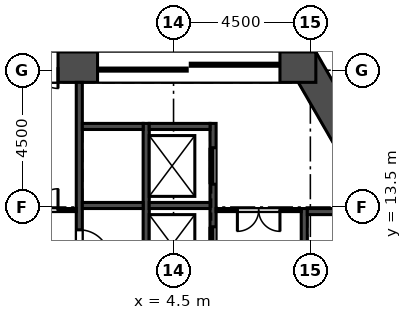
"""IFC4 building model, lengths in metres.
Left out: names, types, materials, properties, quantities, classifications, styles, units other than length and angle.
Written with IfcOpenShell. Run it as: python <this file> out.ifc"""

import sys

from ifc_helpers import new_model, si_unit, direction, frame, frame_2d, origin, place, context, subcontext, project, spatial, rectangle, extrude, element, fill, save


model = new_model("IFC4")
c1 = context("Model", 3, precision=1e-05, world=origin(), true_north=direction((0.0, 1.0)))
c2 = subcontext(c1, "Body", "Model", "MODEL_VIEW")
j1 = project(units=[si_unit("LENGTHUNIT", "METRE"), si_unit("PLANEANGLEUNIT", "RADIAN")], contexts=[c1])
p1 = place(None, origin())
s1 = spatial("IfcSite", under=j1, at=p1, CompositionType="ELEMENT")
p2 = place(p1, origin())
s2 = spatial("IfcBuilding", under=s1, at=p2, CompositionType="ELEMENT")
p3 = place(p2, frame((0.0, 0.0, 218.1)))
s3 = spatial("IfcBuildingStorey", under=s2, at=p3, CompositionType="ELEMENT", Elevation=218.1)
p4 = place(p3, frame((13.167, 10.695, 0.0), z_axis=(0.0, 0.0, 1.0), x_axis=(-0.499995021168, 0.866028278295, 0.0)))
e1 = element("IfcWall", 1, at=p4, inside=s3, PredefinedType="SHEAR", context=c2, shape_type="SweptSolid", body=[
    extrude(rectangle(XDim=8.839, YDim=1.0, at=frame_2d((4.419, 0.0))), origin(), (0.0, 0.0, 1.0), 5.4),
])
p5 = place(p3, frame((9.181, 18.1, 0.0), z_axis=(0.0, 0.0, 1.0), x_axis=(-1.0, 0.0, 0.0)))
e2 = element("IfcWall", 2, at=p5, inside=s3, PredefinedType="SHEAR", context=c2, shape_type="SweptSolid", body=[
    extrude(rectangle(XDim=18.361, YDim=1.0, at=frame_2d((9.181, 0.0))), origin(), (0.0, 0.0, 1.0), 5.4),
])
p6 = place(p5, frame((8.481, 0.0, 0.0)))
e3 = element("IfcOpeningElement", 3, at=p6, cuts=e2, PredefinedType="OPENING", context=c2, shape_type="SweptSolid", body=[
    extrude(rectangle(XDim=1.4, YDim=2.1, at=frame_2d((0.7, 1.05))), frame((0.0, 0.51, 0.0), z_axis=(0.0, -1.0, 0.0), x_axis=(1.0, 0.0, 0.0)), (0.0, 0.0, 1.0), 1.02),
])
p7 = place(p5, frame((11.181, 0.0, 0.0)))
e4 = element("IfcOpeningElement", 4, at=p7, cuts=e2, PredefinedType="OPENING", context=c2, shape_type="SweptSolid", body=[
    extrude(rectangle(XDim=6.0, YDim=2.4, at=frame_2d((3.0, 1.2))), frame((0.0, 0.51, 0.0), z_axis=(0.0, -1.0, 0.0), x_axis=(1.0, 0.0, 0.0)), (0.0, 0.0, 1.0), 1.02),
])
p8 = place(p5, frame((1.181, 0.0, 0.0)))
e5 = element("IfcOpeningElement", 5, at=p8, cuts=e2, PredefinedType="OPENING", context=c2, shape_type="SweptSolid", body=[
    extrude(rectangle(XDim=6.0, YDim=2.4, at=frame_2d((3.0, 1.2))), frame((0.0, 0.51, 0.0), z_axis=(0.0, -1.0, 0.0), x_axis=(1.0, 0.0, 0.0)), (0.0, 0.0, 1.0), 1.02),
])
p9 = place(p3, frame((27.139, 7.709, 0.0), z_axis=(0.0, 0.0, 1.0), x_axis=(-0.500000533701, 0.866025095652, 0.0)))
e6 = element("IfcWall", 6, at=p9, inside=s3, PredefinedType="SOLIDWALL", context=c2, shape_type="SweptSolid", body=[
    extrude(rectangle(XDim=45.573, YDim=0.34, at=frame_2d((22.787, 0.0))), origin(), (0.0, 0.0, 1.0), 5.0),
])
p10 = place(p9, frame((1.893, 0.0, 0.9)))
e7 = element("IfcOpeningElement", 7, at=p10, cuts=e6, PredefinedType="OPENING", context=c2, shape_type="SweptSolid", body=[
    extrude(rectangle(XDim=1.885, YDim=3.0, at=frame_2d((0.942, 1.5))), frame((0.0, 0.18, 0.0), z_axis=(0.0, -1.0, 0.0), x_axis=(1.0, 0.0, 0.0)), (0.0, 0.0, 1.0), 0.36),
])
p11 = place(p9, frame((4.893, 0.0, 0.9)))
e8 = element("IfcOpeningElement", 8, at=p11, cuts=e6, PredefinedType="OPENING", context=c2, shape_type="SweptSolid", body=[
    extrude(rectangle(XDim=1.885, YDim=3.0, at=frame_2d((0.942, 1.5))), frame((0.0, 0.18, 0.0), z_axis=(0.0, -1.0, 0.0), x_axis=(1.0, 0.0, 0.0)), (0.0, 0.0, 1.0), 0.36),
])
p12 = place(p9, frame((7.893, 0.0, 0.9)))
e9 = element("IfcOpeningElement", 9, at=p12, cuts=e6, PredefinedType="OPENING", context=c2, shape_type="SweptSolid", body=[
    extrude(rectangle(XDim=1.885, YDim=3.0, at=frame_2d((0.942, 1.5))), frame((0.0, 0.18, 0.0), z_axis=(0.0, -1.0, 0.0), x_axis=(1.0, 0.0, 0.0)), (0.0, 0.0, 1.0), 0.36),
])
p13 = place(p9, frame((10.893, 0.0, 0.9)))
e10 = element("IfcOpeningElement", 10, at=p13, cuts=e6, PredefinedType="OPENING", context=c2, shape_type="SweptSolid", body=[
    extrude(rectangle(XDim=1.885, YDim=3.0, at=frame_2d((0.942, 1.5))), frame((0.0, 0.18, 0.0), z_axis=(0.0, -1.0, 0.0), x_axis=(1.0, 0.0, 0.0)), (0.0, 0.0, 1.0), 0.36),
])
p14 = place(p9, frame((13.893, 0.0, 0.9)))
e11 = element("IfcOpeningElement", 11, at=p14, cuts=e6, PredefinedType="OPENING", context=c2, shape_type="SweptSolid", body=[
    extrude(rectangle(XDim=1.885, YDim=3.0, at=frame_2d((0.942, 1.5))), frame((0.0, 0.18, 0.0), z_axis=(0.0, -1.0, 0.0), x_axis=(1.0, 0.0, 0.0)), (0.0, 0.0, 1.0), 0.36),
])
p15 = place(p9, frame((16.893, 0.0, 0.9)))
e12 = element("IfcOpeningElement", 12, at=p15, cuts=e6, PredefinedType="OPENING", context=c2, shape_type="SweptSolid", body=[
    extrude(rectangle(XDim=1.885, YDim=3.0, at=frame_2d((0.942, 1.5))), frame((0.0, 0.18, 0.0), z_axis=(0.0, -1.0, 0.0), x_axis=(1.0, 0.0, 0.0)), (0.0, 0.0, 1.0), 0.36),
])
p16 = place(p9, frame((19.893, 0.0, 0.9)))
e13 = element("IfcOpeningElement", 13, at=p16, cuts=e6, PredefinedType="OPENING", context=c2, shape_type="SweptSolid", body=[
    extrude(rectangle(XDim=1.885, YDim=3.0, at=frame_2d((0.942, 1.5))), frame((0.0, 0.18, 0.0), z_axis=(0.0, -1.0, 0.0), x_axis=(1.0, 0.0, 0.0)), (0.0, 0.0, 1.0), 0.36),
])
p17 = place(p9, frame((22.893, 0.0, 0.9)))
e14 = element("IfcOpeningElement", 14, at=p17, cuts=e6, PredefinedType="OPENING", context=c2, shape_type="SweptSolid", body=[
    extrude(rectangle(XDim=1.885, YDim=3.0, at=frame_2d((0.942, 1.5))), frame((0.0, 0.18, 0.0), z_axis=(0.0, -1.0, 0.0), x_axis=(1.0, 0.0, 0.0)), (0.0, 0.0, 1.0), 0.36),
])
p18 = place(p9, frame((25.893, 0.0, 0.9)))
e15 = element("IfcOpeningElement", 15, at=p18, cuts=e6, PredefinedType="OPENING", context=c2, shape_type="SweptSolid", body=[
    extrude(rectangle(XDim=1.885, YDim=3.0, at=frame_2d((0.942, 1.5))), frame((0.0, 0.18, 0.0), z_axis=(0.0, -1.0, 0.0), x_axis=(1.0, 0.0, 0.0)), (0.0, 0.0, 1.0), 0.36),
])
p19 = place(p9, frame((28.893, 0.0, 0.9)))
e16 = element("IfcOpeningElement", 16, at=p19, cuts=e6, PredefinedType="OPENING", context=c2, shape_type="SweptSolid", body=[
    extrude(rectangle(XDim=1.885, YDim=3.0, at=frame_2d((0.942, 1.5))), frame((0.0, 0.18, 0.0), z_axis=(0.0, -1.0, 0.0), x_axis=(1.0, 0.0, 0.0)), (0.0, 0.0, 1.0), 0.36),
])
p20 = place(p9, frame((31.893, 0.0, 0.9)))
e17 = element("IfcOpeningElement", 17, at=p20, cuts=e6, PredefinedType="OPENING", context=c2, shape_type="SweptSolid", body=[
    extrude(rectangle(XDim=1.885, YDim=3.0, at=frame_2d((0.942, 1.5))), frame((0.0, 0.18, 0.0), z_axis=(0.0, -1.0, 0.0), x_axis=(1.0, 0.0, 0.0)), (0.0, 0.0, 1.0), 0.36),
])
p21 = place(p9, frame((34.893, 0.0, 0.9)))
e18 = element("IfcOpeningElement", 18, at=p21, cuts=e6, PredefinedType="OPENING", context=c2, shape_type="SweptSolid", body=[
    extrude(rectangle(XDim=1.885, YDim=3.0, at=frame_2d((0.942, 1.5))), frame((0.0, 0.18, 0.0), z_axis=(0.0, -1.0, 0.0), x_axis=(1.0, 0.0, 0.0)), (0.0, 0.0, 1.0), 0.36),
])
p22 = place(p9, frame((37.893, 0.0, 0.9)))
e19 = element("IfcOpeningElement", 19, at=p22, cuts=e6, PredefinedType="OPENING", context=c2, shape_type="SweptSolid", body=[
    extrude(rectangle(XDim=1.885, YDim=3.0, at=frame_2d((0.942, 1.5))), frame((0.0, 0.18, 0.0), z_axis=(0.0, -1.0, 0.0), x_axis=(1.0, 0.0, 0.0)), (0.0, 0.0, 1.0), 0.36),
])
p23 = place(p9, frame((40.893, 0.0, 0.9)))
e20 = element("IfcOpeningElement", 20, at=p23, cuts=e6, PredefinedType="OPENING", context=c2, shape_type="SweptSolid", body=[
    extrude(rectangle(XDim=1.885, YDim=3.0, at=frame_2d((0.942, 1.5))), frame((0.0, 0.18, 0.0), z_axis=(0.0, -1.0, 0.0), x_axis=(1.0, 0.0, 0.0)), (0.0, 0.0, 1.0), 0.36),
])
p24 = place(p3, frame((8.8, 8.25, -0.4), z_axis=(0.0, 0.0, 1.0), x_axis=(0.0, 1.0, 0.0)))
e21 = element("IfcWall", 21, at=p24, inside=s3, PredefinedType="SOLIDWALL", context=c2, shape_type="SweptSolid", body=[
    extrude(rectangle(XDim=5.2, YDim=0.2, at=frame_2d((2.6, 0.0))), origin(), (0.0, 0.0, 1.0), 5.4),
])
p25 = place(p3, frame((5.8, 8.25, -0.4), z_axis=(0.0, 0.0, 1.0), x_axis=(0.0, 1.0, 0.0)))
e22 = element("IfcWall", 22, at=p25, inside=s3, PredefinedType="SOLIDWALL", context=c2, shape_type="SweptSolid", body=[
    extrude(rectangle(XDim=8.0, YDim=0.2, at=frame_2d((4.0, 0.0))), origin(), (0.0, 0.0, 1.0), 5.4),
])
p26 = place(p25, frame((0.8, 0.0, 0.4)))
e23 = element("IfcOpeningElement", 23, at=p26, cuts=e22, PredefinedType="OPENING", context=c2, shape_type="SweptSolid", body=[
    extrude(rectangle(XDim=1.2, YDim=2.1, at=frame_2d((0.6, 1.05))), frame((0.0, 0.11, 0.0), z_axis=(0.0, -1.0, 0.0), x_axis=(1.0, 0.0, 0.0)), (0.0, 0.0, 1.0), 0.22),
])
p27 = place(p25, frame((3.4, 0.0, 0.4)))
e24 = element("IfcOpeningElement", 24, at=p27, cuts=e22, PredefinedType="OPENING", context=c2, shape_type="SweptSolid", body=[
    extrude(rectangle(XDim=1.2, YDim=2.1, at=frame_2d((0.6, 1.05))), frame((0.0, 0.11, 0.0), z_axis=(0.0, -1.0, 0.0), x_axis=(1.0, 0.0, 0.0)), (0.0, 0.0, 1.0), 0.22),
])
p28 = place(p25, frame((6.0, 0.0, 0.4)))
e25 = element("IfcOpeningElement", 25, at=p28, cuts=e22, PredefinedType="OPENING", context=c2, shape_type="SweptSolid", body=[
    extrude(rectangle(XDim=1.2, YDim=2.1, at=frame_2d((0.6, 1.05))), frame((0.0, 0.11, 0.0), z_axis=(0.0, -1.0, 0.0), x_axis=(1.0, 0.0, 0.0)), (0.0, 0.0, 1.0), 0.22),
])
p29 = place(p3, frame((3.6, 8.45, -0.4), z_axis=(0.0, 0.0, 1.0), x_axis=(0.0, 1.0, 0.0)))
e26 = element("IfcWall", 26, at=p29, inside=s3, PredefinedType="SOLIDWALL", context=c2, shape_type="SweptSolid", body=[
    extrude(rectangle(XDim=7.8, YDim=0.2, at=frame_2d((3.9, 0.0))), origin(), (0.0, 0.0, 1.0), 5.4),
])
p30 = place(p3, frame((1.4, 5.85, -0.4), z_axis=(0.0, 0.0, 1.0), x_axis=(0.0, 1.0, 0.0)))
e27 = element("IfcWall", 27, at=p30, inside=s3, PredefinedType="SOLIDWALL", context=c2, shape_type="SweptSolid", body=[
    extrude(rectangle(XDim=11.75, YDim=0.2, at=frame_2d((5.875, 0.0))), origin(), (0.0, 0.0, 1.0), 5.4),
])
p31 = place(p30, frame((0.65, 0.0, 0.4)))
e28 = element("IfcOpeningElement", 28, at=p31, cuts=e27, PredefinedType="OPENING", context=c2, shape_type="SweptSolid", body=[
    extrude(rectangle(XDim=1.1, YDim=2.1, at=frame_2d((0.55, 1.05))), frame((0.0, 0.11, 0.0), z_axis=(0.0, -1.0, 0.0), x_axis=(1.0, 0.0, 0.0)), (0.0, 0.0, 1.0), 0.22),
])
p32 = place(p30, frame((5.9, 0.0, 0.4)))
e29 = element("IfcOpeningElement", 29, at=p32, cuts=e27, PredefinedType="OPENING", context=c2, shape_type="SweptSolid", body=[
    extrude(rectangle(XDim=1.0, YDim=2.1, at=frame_2d((0.5, 1.05))), frame((0.0, 0.11, 0.0), z_axis=(0.0, -1.0, 0.0), x_axis=(1.0, 0.0, 0.0)), (0.0, 0.0, 1.0), 0.22),
])
for number, where, z_axis, x_axis in (
    (30, (8.9, 13.35, -0.4), (0.0, 0.0, 1.0), (1.0, 0.0, 0.0)),
    (31, (3.7, 13.55, -0.4), (0.0, 0.0, 1.0), (1.0, 0.0, 0.0)),
    (32, (3.7, 16.15, -0.4), (0.0, 0.0, 1.0), (1.0, 0.0, 0.0)),
    (33, (1.5, 13.55, -0.4), (0.0, 0.0, 1.0), (1.0, 0.0, 0.0)),
    (34, (1.5, 16.15, -0.4), (0.0, 0.0, 1.0), (1.0, 0.0, 0.0)),
):
    element("IfcWall", number, at=place(p3, frame(where, z_axis=z_axis, x_axis=x_axis)), inside=s3, PredefinedType="SOLIDWALL", context=c2, shape_type="SweptSolid", body=[
        extrude(rectangle(XDim=2.0, YDim=0.2, at=frame_2d((1.0, 0.0))), origin(), (0.0, 0.0, 1.0), 5.4),
    ])
p33 = place(p3, frame((5.9, 13.4, 0.0), z_axis=(0.0, 0.0, 1.0), x_axis=(1.0, 0.0, 0.0)))
e35 = element("IfcWall", 35, at=p33, inside=s3, PredefinedType="PARTITIONING", context=c2, shape_type="SweptSolid", body=[
    extrude(rectangle(XDim=2.8, YDim=0.1, at=frame_2d((1.4, 0.0))), origin(), (0.0, 0.0, 1.0), 5.0),
])
p34 = place(p33, frame((0.7, 0.0, 0.0)))
e36 = element("IfcOpeningElement", 36, at=p34, cuts=e35, PredefinedType="OPENING", context=c2, shape_type="SweptSolid", body=[
    extrude(rectangle(XDim=1.4, YDim=2.1, at=frame_2d((0.7, 1.05))), frame((0.0, 0.06, 0.0), z_axis=(0.0, -1.0, 0.0), x_axis=(1.0, 0.0, 0.0)), (0.0, 0.0, 1.0), 0.12),
])
p35 = place(p3, frame((-1.3, 13.4, 0.0), z_axis=(0.0, 0.0, 1.0), x_axis=(1.0, 0.0, 0.0)))
e37 = element("IfcWall", 37, at=p35, inside=s3, PredefinedType="PARTITIONING", context=c2, shape_type="SweptSolid", body=[
    extrude(rectangle(XDim=2.6, YDim=0.1, at=frame_2d((1.3, 0.0))), origin(), (0.0, 0.0, 1.0), 5.0),
])
p36 = place(p35, frame((0.6, 0.0, 0.0)))
e38 = element("IfcOpeningElement", 38, at=p36, cuts=e37, PredefinedType="OPENING", context=c2, shape_type="SweptSolid", body=[
    extrude(rectangle(XDim=1.4, YDim=2.1, at=frame_2d((0.7, 1.05))), frame((0.0, 0.06, 0.0), z_axis=(0.0, -1.0, 0.0), x_axis=(1.0, 0.0, 0.0)), (0.0, 0.0, 1.0), 0.12),
])
p37 = place(p27, origin())
e39 = element("IfcDoor", 39, at=p37, inside=s3, OperationType="SLIDING_TO_LEFT", PredefinedType="DOOR", context=c2, shape_type="SweptSolid", body=[
    extrude(rectangle(XDim=1.2, YDim=2.1, at=frame_2d((0.6, 1.05))), frame((0.0, 0.025, 0.0), z_axis=(0.0, -1.0, 0.0), x_axis=(1.0, 0.0, 0.0)), (0.0, 0.0, 1.0), 0.05),
])
fill(e24, e39)
p38 = place(p28, origin())
e40 = element("IfcDoor", 40, at=p38, inside=s3, OperationType="SLIDING_TO_LEFT", PredefinedType="DOOR", context=c2, shape_type="SweptSolid", body=[
    extrude(rectangle(XDim=1.2, YDim=2.1, at=frame_2d((0.6, 1.05))), frame((0.0, 0.025, 0.0), z_axis=(0.0, -1.0, 0.0), x_axis=(1.0, 0.0, 0.0)), (0.0, 0.0, 1.0), 0.05),
])
fill(e25, e40)
p39 = place(p32, frame((1.0, 0.0, 0.0), z_axis=(0.0, 0.0, 1.0), x_axis=(-1.0, 0.0, 0.0)))
e41 = element("IfcDoor", 41, at=p39, inside=s3, OperationType="SINGLE_SWING_RIGHT", PredefinedType="DOOR", context=c2, shape_type="SweptSolid", body=[
    extrude(rectangle(XDim=1.0, YDim=2.1, at=frame_2d((0.5, 1.05))), frame((0.0, 0.025, 0.0), z_axis=(0.0, -1.0, 0.0), x_axis=(1.0, 0.0, 0.0)), (0.0, 0.0, 1.0), 0.05),
])
fill(e29, e41)
p40 = place(p34, frame((1.4, 0.0, 0.0), z_axis=(0.0, 0.0, 1.0), x_axis=(-1.0, 0.0, 0.0)))
e42 = element("IfcDoor", 42, at=p40, inside=s3, OperationType="DOUBLE_DOOR_SINGLE_SWING", PredefinedType="DOOR", context=c2, shape_type="SweptSolid", body=[
    extrude(rectangle(XDim=1.4, YDim=2.1, at=frame_2d((0.7, 1.05))), frame((0.0, 0.025, 0.0), z_axis=(0.0, -1.0, 0.0), x_axis=(1.0, 0.0, 0.0)), (0.0, 0.0, 1.0), 0.05),
])
fill(e36, e42)
p41 = place(p36, origin())
e43 = element("IfcDoor", 43, at=p41, inside=s3, OperationType="DOUBLE_DOOR_SINGLE_SWING", PredefinedType="DOOR", context=c2, shape_type="SweptSolid", body=[
    extrude(rectangle(XDim=1.4, YDim=2.1, at=frame_2d((0.7, 1.05))), frame((0.0, 0.025, 0.0), z_axis=(0.0, -1.0, 0.0), x_axis=(1.0, 0.0, 0.0)), (0.0, 0.0, 1.0), 0.05),
])
fill(e38, e43)
p42 = place(p6, origin())
e44 = element("IfcDoor", 44, at=p42, inside=s3, OperationType="DOUBLE_DOOR_SINGLE_SWING", PredefinedType="DOOR", context=c2, shape_type="SweptSolid", body=[
    extrude(rectangle(XDim=1.4, YDim=2.1, at=frame_2d((0.7, 1.05))), frame((0.0, 0.025, 0.0), z_axis=(0.0, -1.0, 0.0), x_axis=(1.0, 0.0, 0.0)), (0.0, 0.0, 1.0), 0.05),
])
fill(e3, e44)
p43 = place(p8, origin())
e45 = element("IfcDoor", 45, at=p43, inside=s3, OperationType="DOUBLE_DOOR_SLIDING", PredefinedType="DOOR", context=c2, shape_type="SweptSolid", body=[
    extrude(rectangle(XDim=6.0, YDim=2.4, at=frame_2d((3.0, 1.2))), frame((0.0, 0.025, 0.0), z_axis=(0.0, -1.0, 0.0), x_axis=(1.0, 0.0, 0.0)), (0.0, 0.0, 1.0), 0.05),
])
fill(e5, e45)
save(model, sys.argv[1])
